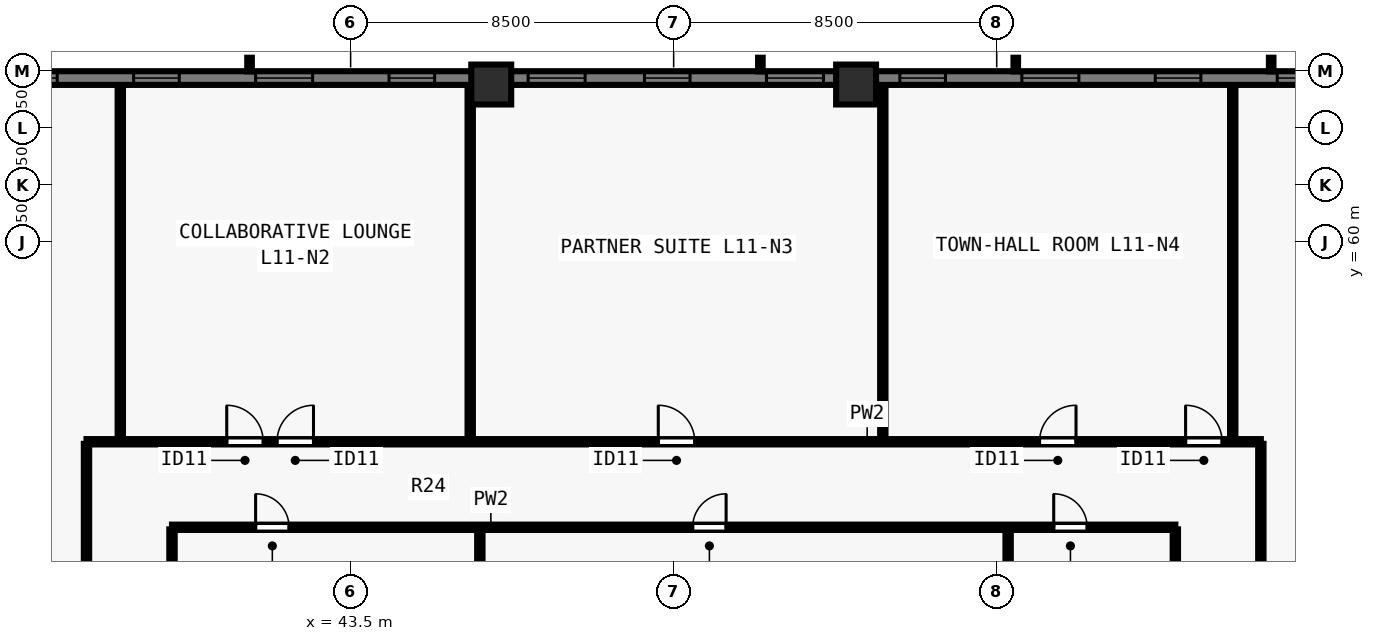
"""IFC4 building model, lengths in metres.
Left out: names, types, materials, properties, quantities, classifications, styles, units other than length and angle.
Written with IfcOpenShell. Run it as: python <this file> out.ifc"""

import sys

from ifc_helpers import new_model, si_unit, direction, frame, frame_2d, origin, origin_2d, place, context, subcontext, project, spatial, rectangle, extrude, element, fill, save


model = new_model("IFC4")
c1 = context("Model", 3, precision=1e-05, world=origin(), true_north=direction((0.0, 1.0)))
c2 = subcontext(c1, "Body", "Model", "MODEL_VIEW")
j1 = project(units=[si_unit("LENGTHUNIT", "METRE"), si_unit("PLANEANGLEUNIT", "RADIAN")], contexts=[c1])
p1 = place(None, origin())
s1 = spatial("IfcSite", under=j1, at=p1, CompositionType="ELEMENT")
p2 = place(p1, origin())
s2 = spatial("IfcBuilding", under=s1, at=p2, CompositionType="ELEMENT")
p3 = place(p2, frame((0.0, 0.0, 44.5)))
s3 = spatial("IfcBuildingStorey", under=s2, at=p3, CompositionType="ELEMENT", Elevation=44.5)
for number, where, z_axis, x_axis in (
    (1, (56.8, 64.15, 0.0), (0.0, 0.0, 1.0), (1.0, 0.0, 0.0)),
    (2, (47.2, 64.15, 0.0), (0.0, 0.0, 1.0), (1.0, 0.0, 0.0)),
):
    element("IfcColumn", number, at=place(p3, frame(where, z_axis=z_axis, x_axis=x_axis)), inside=s3, PredefinedType="COLUMN", context=c2, shape_type="SweptSolid", body=[
        extrude(rectangle(XDim=1.05, YDim=1.05, at=origin_2d()), origin(), (0.0, 0.0, 1.0), 3.5),
    ])
p4 = place(p3, frame((29.5, 64.32, 0.0), z_axis=(0.0, 0.0, 1.0), x_axis=(1.0, 0.0, 0.0)))
e3 = element("IfcWall", 3, at=p4, inside=s3, PredefinedType="SOLIDWALL", context=c2, shape_type="SweptSolid", body=[
    extrude(rectangle(XDim=44.662, YDim=0.36, at=frame_2d((22.331, 0.0))), origin(), (0.0, 0.0, 1.0), 3.28),
])
p5 = place(p4, frame((4.78, 0.0, 0.8)))
e4 = element("IfcOpeningElement", 4, at=p5, cuts=e3, PredefinedType="OPENING", context=c2, shape_type="SweptSolid", body=[
    extrude(rectangle(XDim=1.5, YDim=1.544, at=frame_2d((0.75, 0.772))), frame((0.0, 0.19, 0.0), z_axis=(0.0, -1.0, 0.0), x_axis=(1.0, 0.0, 0.0)), (0.0, 0.0, 1.0), 0.38),
])
p6 = place(p4, frame((8.29, 0.0, 0.8)))
e5 = element("IfcOpeningElement", 5, at=p6, cuts=e3, PredefinedType="OPENING", context=c2, shape_type="SweptSolid", body=[
    extrude(rectangle(XDim=1.2, YDim=1.544, at=frame_2d((0.6, 0.772))), frame((0.0, 0.19, 0.0), z_axis=(0.0, -1.0, 0.0), x_axis=(1.0, 0.0, 0.0)), (0.0, 0.0, 1.0), 0.38),
])
p7 = place(p4, frame((11.5, 0.0, 0.8)))
e6 = element("IfcOpeningElement", 6, at=p7, cuts=e3, PredefinedType="OPENING", context=c2, shape_type="SweptSolid", body=[
    extrude(rectangle(XDim=1.5, YDim=1.544, at=frame_2d((0.75, 0.772))), frame((0.0, 0.19, 0.0), z_axis=(0.0, -1.0, 0.0), x_axis=(1.0, 0.0, 0.0)), (0.0, 0.0, 1.0), 0.38),
])
p8 = place(p4, frame((15.01, 0.0, 0.8)))
e7 = element("IfcOpeningElement", 7, at=p8, cuts=e3, PredefinedType="OPENING", context=c2, shape_type="SweptSolid", body=[
    extrude(rectangle(XDim=1.2, YDim=1.544, at=frame_2d((0.6, 0.772))), frame((0.0, 0.19, 0.0), z_axis=(0.0, -1.0, 0.0), x_axis=(1.0, 0.0, 0.0)), (0.0, 0.0, 1.0), 0.38),
])
p9 = place(p4, frame((18.671, 0.0, 0.8)))
e8 = element("IfcOpeningElement", 8, at=p9, cuts=e3, PredefinedType="OPENING", context=c2, shape_type="SweptSolid", body=[
    extrude(rectangle(XDim=1.5, YDim=1.544, at=frame_2d((0.75, 0.772))), frame((0.0, 0.19, 0.0), z_axis=(0.0, -1.0, 0.0), x_axis=(1.0, 0.0, 0.0)), (0.0, 0.0, 1.0), 0.38),
])
p10 = place(p4, frame((21.731, 0.0, 0.8)))
e9 = element("IfcOpeningElement", 9, at=p10, cuts=e3, PredefinedType="OPENING", context=c2, shape_type="SweptSolid", body=[
    extrude(rectangle(XDim=1.2, YDim=1.544, at=frame_2d((0.6, 0.772))), frame((0.0, 0.19, 0.0), z_axis=(0.0, -1.0, 0.0), x_axis=(1.0, 0.0, 0.0)), (0.0, 0.0, 1.0), 0.38),
])
p11 = place(p4, frame((24.941, 0.0, 0.8)))
e10 = element("IfcOpeningElement", 10, at=p11, cuts=e3, PredefinedType="OPENING", context=c2, shape_type="SweptSolid", body=[
    extrude(rectangle(XDim=1.5, YDim=1.544, at=frame_2d((0.75, 0.772))), frame((0.0, 0.19, 0.0), z_axis=(0.0, -1.0, 0.0), x_axis=(1.0, 0.0, 0.0)), (0.0, 0.0, 1.0), 0.38),
])
p12 = place(p4, frame((28.451, 0.0, 0.8)))
e11 = element("IfcOpeningElement", 11, at=p12, cuts=e3, PredefinedType="OPENING", context=c2, shape_type="SweptSolid", body=[
    extrude(rectangle(XDim=1.2, YDim=1.544, at=frame_2d((0.6, 0.772))), frame((0.0, 0.19, 0.0), z_axis=(0.0, -1.0, 0.0), x_axis=(1.0, 0.0, 0.0)), (0.0, 0.0, 1.0), 0.38),
])
p13 = place(p4, frame((31.662, 0.0, 0.8)))
e12 = element("IfcOpeningElement", 12, at=p13, cuts=e3, PredefinedType="OPENING", context=c2, shape_type="SweptSolid", body=[
    extrude(rectangle(XDim=1.5, YDim=1.544, at=frame_2d((0.75, 0.772))), frame((0.0, 0.19, 0.0), z_axis=(0.0, -1.0, 0.0), x_axis=(1.0, 0.0, 0.0)), (0.0, 0.0, 1.0), 0.38),
])
p14 = place(p4, frame((35.172, 0.0, 0.8)))
e13 = element("IfcOpeningElement", 13, at=p14, cuts=e3, PredefinedType="OPENING", context=c2, shape_type="SweptSolid", body=[
    extrude(rectangle(XDim=1.2, YDim=1.544, at=frame_2d((0.6, 0.772))), frame((0.0, 0.19, 0.0), z_axis=(0.0, -1.0, 0.0), x_axis=(1.0, 0.0, 0.0)), (0.0, 0.0, 1.0), 0.38),
])
p15 = place(p4, frame((38.382, 0.0, 0.8)))
e14 = element("IfcOpeningElement", 14, at=p15, cuts=e3, PredefinedType="OPENING", context=c2, shape_type="SweptSolid", body=[
    extrude(rectangle(XDim=1.5, YDim=1.544, at=frame_2d((0.75, 0.772))), frame((0.0, 0.19, 0.0), z_axis=(0.0, -1.0, 0.0), x_axis=(1.0, 0.0, 0.0)), (0.0, 0.0, 1.0), 0.38),
])
p16 = place(p3, frame((36.55, 54.75, 0.0), z_axis=(0.0, 0.0, 1.0), x_axis=(1.0, 0.0, 0.0)))
e15 = element("IfcWall", 15, at=p16, inside=s3, PredefinedType="PARTITIONING", context=c2, shape_type="SweptSolid", body=[
    extrude(rectangle(XDim=30.9, YDim=0.14, at=frame_2d((15.45, 0.0))), origin(), (0.0, 0.0, 1.0), 3.28),
])
p17 = place(p16, frame((3.69, 0.0, 0.0)))
e16 = element("IfcOpeningElement", 16, at=p17, cuts=e15, PredefinedType="OPENING", context=c2, shape_type="SweptSolid", body=[
    extrude(rectangle(XDim=0.96, YDim=2.12, at=frame_2d((0.48, 1.06))), frame((0.0, 0.08, 0.0), z_axis=(0.0, -1.0, 0.0), x_axis=(1.0, 0.0, 0.0)), (0.0, 0.0, 1.0), 0.16),
])
p18 = place(p16, frame((5.013, 0.0, 0.0)))
e17 = element("IfcOpeningElement", 17, at=p18, cuts=e15, PredefinedType="OPENING", context=c2, shape_type="SweptSolid", body=[
    extrude(rectangle(XDim=0.96, YDim=2.12, at=frame_2d((0.48, 1.06))), frame((0.0, 0.08, 0.0), z_axis=(0.0, -1.0, 0.0), x_axis=(1.0, 0.0, 0.0)), (0.0, 0.0, 1.0), 0.16),
])
p19 = place(p16, frame((15.045, 0.0, 0.0)))
e18 = element("IfcOpeningElement", 18, at=p19, cuts=e15, PredefinedType="OPENING", context=c2, shape_type="SweptSolid", body=[
    extrude(rectangle(XDim=0.96, YDim=2.12, at=frame_2d((0.48, 1.06))), frame((0.0, 0.08, 0.0), z_axis=(0.0, -1.0, 0.0), x_axis=(1.0, 0.0, 0.0)), (0.0, 0.0, 1.0), 0.16),
])
p20 = place(p16, frame((25.077, 0.0, 0.0)))
e19 = element("IfcOpeningElement", 19, at=p20, cuts=e15, PredefinedType="OPENING", context=c2, shape_type="SweptSolid", body=[
    extrude(rectangle(XDim=0.96, YDim=2.12, at=frame_2d((0.48, 1.06))), frame((0.0, 0.08, 0.0), z_axis=(0.0, -1.0, 0.0), x_axis=(1.0, 0.0, 0.0)), (0.0, 0.0, 1.0), 0.16),
])
p21 = place(p16, frame((28.92, 0.0, 0.0)))
e20 = element("IfcOpeningElement", 20, at=p21, cuts=e15, PredefinedType="OPENING", context=c2, shape_type="SweptSolid", body=[
    extrude(rectangle(XDim=0.96, YDim=2.12, at=frame_2d((0.48, 1.06))), frame((0.0, 0.08, 0.0), z_axis=(0.0, -1.0, 0.0), x_axis=(1.0, 0.0, 0.0)), (0.0, 0.0, 1.0), 0.16),
])
p22 = place(p3, frame((36.55, 23.305, 0.0), z_axis=(0.0, 0.0, 1.0), x_axis=(0.0, 1.0, 0.0)))
e21 = element("IfcWall", 21, at=p22, inside=s3, PredefinedType="PARTITIONING", context=c2, shape_type="SweptSolid", body=[
    extrude(rectangle(XDim=31.39, YDim=0.14, at=frame_2d((15.695, 0.0))), origin(), (0.0, 0.0, 1.0), 3.28),
])
p23 = place(p22, frame((3.307, 0.0, 0.0)))
e22 = element("IfcOpeningElement", 22, at=p23, cuts=e21, PredefinedType="OPENING", context=c2, shape_type="SweptSolid", body=[
    extrude(rectangle(XDim=0.96, YDim=2.12, at=frame_2d((0.48, 1.06))), frame((0.0, 0.08, 0.0), z_axis=(0.0, -1.0, 0.0), x_axis=(1.0, 0.0, 0.0)), (0.0, 0.0, 1.0), 0.16),
])
p24 = place(p22, frame((11.25, 0.0, 0.0)))
e23 = element("IfcOpeningElement", 23, at=p24, cuts=e21, PredefinedType="OPENING", context=c2, shape_type="SweptSolid", body=[
    extrude(rectangle(XDim=0.96, YDim=2.12, at=frame_2d((0.48, 1.06))), frame((0.0, 0.08, 0.0), z_axis=(0.0, -1.0, 0.0), x_axis=(1.0, 0.0, 0.0)), (0.0, 0.0, 1.0), 0.16),
])
p25 = place(p22, frame((19.075, 0.0, 0.0)))
e24 = element("IfcOpeningElement", 24, at=p25, cuts=e21, PredefinedType="OPENING", context=c2, shape_type="SweptSolid", body=[
    extrude(rectangle(XDim=0.96, YDim=2.12, at=frame_2d((0.48, 1.06))), frame((0.0, 0.08, 0.0), z_axis=(0.0, -1.0, 0.0), x_axis=(1.0, 0.0, 0.0)), (0.0, 0.0, 1.0), 0.16),
])
p26 = place(p22, frame((26.782, 0.0, 0.0)))
e25 = element("IfcOpeningElement", 25, at=p26, cuts=e21, PredefinedType="OPENING", context=c2, shape_type="SweptSolid", body=[
    extrude(rectangle(XDim=0.96, YDim=2.12, at=frame_2d((0.48, 1.06))), frame((0.0, 0.08, 0.0), z_axis=(0.0, -1.0, 0.0), x_axis=(1.0, 0.0, 0.0)), (0.0, 0.0, 1.0), 0.16),
])
p27 = place(p3, frame((67.45, 23.305, 0.0), z_axis=(0.0, 0.0, 1.0), x_axis=(0.0, 1.0, 0.0)))
e26 = element("IfcWall", 26, at=p27, inside=s3, PredefinedType="PARTITIONING", context=c2, shape_type="SweptSolid", body=[
    extrude(rectangle(XDim=31.39, YDim=0.14, at=frame_2d((15.695, 0.0))), origin(), (0.0, 0.0, 1.0), 3.28),
])
p28 = place(p27, frame((7.561, 0.0, 0.0)))
e27 = element("IfcOpeningElement", 27, at=p28, cuts=e26, PredefinedType="OPENING", context=c2, shape_type="SweptSolid", body=[
    extrude(rectangle(XDim=0.96, YDim=2.12, at=frame_2d((0.48, 1.06))), frame((0.0, 0.08, 0.0), z_axis=(0.0, -1.0, 0.0), x_axis=(1.0, 0.0, 0.0)), (0.0, 0.0, 1.0), 0.16),
])
p29 = place(p27, frame((23.211, 0.0, 0.0)))
e28 = element("IfcOpeningElement", 28, at=p29, cuts=e26, PredefinedType="OPENING", context=c2, shape_type="SweptSolid", body=[
    extrude(rectangle(XDim=0.96, YDim=2.12, at=frame_2d((0.48, 1.06))), frame((0.0, 0.08, 0.0), z_axis=(0.0, -1.0, 0.0), x_axis=(1.0, 0.0, 0.0)), (0.0, 0.0, 1.0), 0.16),
])
p30 = place(p3, frame((38.8, 52.5, 0.0), z_axis=(0.0, 0.0, 1.0), x_axis=(1.0, 0.0, 0.0)))
e29 = element("IfcWall", 29, at=p30, inside=s3, PredefinedType="PARTITIONING", context=c2, shape_type="SweptSolid", body=[
    extrude(rectangle(XDim=26.4, YDim=0.14, at=frame_2d((13.2, 0.0))), origin(), (0.0, 0.0, 1.0), 3.28),
])
p31 = place(p30, frame((2.2, 0.0, 0.0)))
e30 = element("IfcOpeningElement", 30, at=p31, cuts=e29, PredefinedType="OPENING", context=c2, shape_type="SweptSolid", body=[
    extrude(rectangle(XDim=0.88, YDim=2.1, at=frame_2d((0.44, 1.05))), frame((0.0, 0.08, 0.0), z_axis=(0.0, -1.0, 0.0), x_axis=(1.0, 0.0, 0.0)), (0.0, 0.0, 1.0), 0.16),
])
p32 = place(p30, frame((13.7, 0.0, 0.0)))
e31 = element("IfcOpeningElement", 31, at=p32, cuts=e29, PredefinedType="OPENING", context=c2, shape_type="SweptSolid", body=[
    extrude(rectangle(XDim=0.88, YDim=2.1, at=frame_2d((0.44, 1.05))), frame((0.0, 0.08, 0.0), z_axis=(0.0, -1.0, 0.0), x_axis=(1.0, 0.0, 0.0)), (0.0, 0.0, 1.0), 0.16),
])
p33 = place(p30, frame((23.2, 0.0, 0.0)))
e32 = element("IfcOpeningElement", 32, at=p33, cuts=e29, PredefinedType="OPENING", context=c2, shape_type="SweptSolid", body=[
    extrude(rectangle(XDim=0.88, YDim=2.1, at=frame_2d((0.44, 1.05))), frame((0.0, 0.08, 0.0), z_axis=(0.0, -1.0, 0.0), x_axis=(1.0, 0.0, 0.0)), (0.0, 0.0, 1.0), 0.16),
])
p34 = place(p3, frame((38.8, 40.8, 0.0), z_axis=(0.0, 0.0, 1.0), x_axis=(0.0, 1.0, 0.0)))
e33 = element("IfcWall", 33, at=p34, inside=s3, PredefinedType="PARTITIONING", context=c2, shape_type="SweptSolid", body=[
    extrude(rectangle(XDim=11.645, YDim=0.14, at=frame_2d((5.823, 0.0))), origin(), (0.0, 0.0, 1.0), 3.28),
])
p35 = place(p34, frame((2.5, 0.0, 0.0)))
e34 = element("IfcOpeningElement", 34, at=p35, cuts=e33, PredefinedType="OPENING", context=c2, shape_type="SweptSolid", body=[
    extrude(rectangle(XDim=0.88, YDim=2.1, at=frame_2d((0.44, 1.05))), frame((0.0, 0.08, 0.0), z_axis=(0.0, -1.0, 0.0), x_axis=(1.0, 0.0, 0.0)), (0.0, 0.0, 1.0), 0.16),
])
p36 = place(p3, frame((65.2, 40.8, 0.0), z_axis=(0.0, 0.0, 1.0), x_axis=(0.0, 1.0, 0.0)))
e35 = element("IfcWall", 35, at=p36, inside=s3, PredefinedType="PARTITIONING", context=c2, shape_type="SweptSolid", body=[
    extrude(rectangle(XDim=11.645, YDim=0.14, at=frame_2d((5.823, 0.0))), origin(), (0.0, 0.0, 1.0), 3.28),
])
p37 = place(p36, frame((2.5, 0.0, 0.0)))
e36 = element("IfcOpeningElement", 36, at=p37, cuts=e35, PredefinedType="OPENING", context=c2, shape_type="SweptSolid", body=[
    extrude(rectangle(XDim=0.88, YDim=2.1, at=frame_2d((0.44, 1.05))), frame((0.0, 0.08, 0.0), z_axis=(0.0, -1.0, 0.0), x_axis=(1.0, 0.0, 0.0)), (0.0, 0.0, 1.0), 0.16),
])
p38 = place(p3, frame((46.9, 47.76, 0.0), z_axis=(0.0, 0.0, 1.0), x_axis=(0.0, 1.0, 0.0)))
e37 = element("IfcWall", 37, at=p38, inside=s3, PredefinedType="PARTITIONING", context=c2, shape_type="SweptSolid", body=[
    extrude(rectangle(XDim=4.685, YDim=0.14, at=frame_2d((2.343, 0.0))), origin(), (0.0, 0.0, 1.0), 3.28),
])
p39 = place(p3, frame((60.8, 47.76, 0.0), z_axis=(0.0, 0.0, 1.0), x_axis=(0.0, 1.0, 0.0)))
e38 = element("IfcWall", 38, at=p39, inside=s3, PredefinedType="PARTITIONING", context=c2, shape_type="SweptSolid", body=[
    extrude(rectangle(XDim=4.685, YDim=0.14, at=frame_2d((2.343, 0.0))), origin(), (0.0, 0.0, 1.0), 2.439),
])
for number, where, z_axis, x_axis in (
    (39, (37.439, 54.85, 0.0), (0.0, 0.0, 1.0), (0.0, 1.0, 0.0)),
    (40, (46.646, 54.85, 0.0), (0.0, 0.0, 1.0), (0.0, 1.0, 0.0)),
    (41, (57.503, 54.85, 0.0), (0.0, 0.0, 1.0), (0.0, 1.0, 0.0)),
):
    element("IfcWall", number, at=place(p3, frame(where, z_axis=z_axis, x_axis=x_axis)), inside=s3, PredefinedType="PARTITIONING", context=c2, shape_type="SweptSolid", body=[
        extrude(rectangle(XDim=9.23, YDim=0.14, at=frame_2d((4.615, 0.0))), origin(), (0.0, 0.0, 1.0), 3.28),
    ])
p40 = place(p3, frame((66.71, 54.85, 0.0), z_axis=(0.0, 0.0, 1.0), x_axis=(0.0, 1.0, 0.0)))
e42 = element("IfcWall", 42, at=p40, inside=s3, PredefinedType="PARTITIONING", context=c2, shape_type="SweptSolid", body=[
    extrude(rectangle(XDim=9.23, YDim=0.14, at=frame_2d((4.615, 0.0))), origin(), (0.0, 0.0, 1.0), 2.439),
])
p41 = place(p5, origin())
e43 = element("IfcWindow", 43, at=p41, inside=s3, PartitioningType="SINGLE_PANEL", PredefinedType="WINDOW", context=c2, shape_type="SweptSolid", body=[
    extrude(rectangle(XDim=1.5, YDim=1.544, at=frame_2d((0.75, 0.772))), frame((0.0, -0.05, 0.0), z_axis=(0.0, -1.0, 0.0), x_axis=(1.0, 0.0, 0.0)), (0.0, 0.0, 1.0), 0.06),
])
fill(e4, e43)
p42 = place(p6, origin())
e44 = element("IfcWindow", 44, at=p42, inside=s3, PartitioningType="SINGLE_PANEL", PredefinedType="WINDOW", context=c2, shape_type="SweptSolid", body=[
    extrude(rectangle(XDim=1.2, YDim=1.544, at=frame_2d((0.6, 0.772))), frame((0.0, -0.05, 0.0), z_axis=(0.0, -1.0, 0.0), x_axis=(1.0, 0.0, 0.0)), (0.0, 0.0, 1.0), 0.06),
])
fill(e5, e44)
p43 = place(p7, origin())
e45 = element("IfcWindow", 45, at=p43, inside=s3, PartitioningType="SINGLE_PANEL", PredefinedType="WINDOW", context=c2, shape_type="SweptSolid", body=[
    extrude(rectangle(XDim=1.5, YDim=1.544, at=frame_2d((0.75, 0.772))), frame((0.0, -0.05, 0.0), z_axis=(0.0, -1.0, 0.0), x_axis=(1.0, 0.0, 0.0)), (0.0, 0.0, 1.0), 0.06),
])
fill(e6, e45)
p44 = place(p8, origin())
e46 = element("IfcWindow", 46, at=p44, inside=s3, PartitioningType="SINGLE_PANEL", PredefinedType="WINDOW", context=c2, shape_type="SweptSolid", body=[
    extrude(rectangle(XDim=1.2, YDim=1.544, at=frame_2d((0.6, 0.772))), frame((0.0, -0.05, 0.0), z_axis=(0.0, -1.0, 0.0), x_axis=(1.0, 0.0, 0.0)), (0.0, 0.0, 1.0), 0.06),
])
fill(e7, e46)
p45 = place(p9, origin())
e47 = element("IfcWindow", 47, at=p45, inside=s3, PartitioningType="SINGLE_PANEL", PredefinedType="WINDOW", context=c2, shape_type="SweptSolid", body=[
    extrude(rectangle(XDim=1.5, YDim=1.544, at=frame_2d((0.75, 0.772))), frame((0.0, -0.05, 0.0), z_axis=(0.0, -1.0, 0.0), x_axis=(1.0, 0.0, 0.0)), (0.0, 0.0, 1.0), 0.06),
])
fill(e8, e47)
p46 = place(p10, origin())
e48 = element("IfcWindow", 48, at=p46, inside=s3, PartitioningType="SINGLE_PANEL", PredefinedType="WINDOW", context=c2, shape_type="SweptSolid", body=[
    extrude(rectangle(XDim=1.2, YDim=1.544, at=frame_2d((0.6, 0.772))), frame((0.0, -0.05, 0.0), z_axis=(0.0, -1.0, 0.0), x_axis=(1.0, 0.0, 0.0)), (0.0, 0.0, 1.0), 0.06),
])
fill(e9, e48)
p47 = place(p11, origin())
e49 = element("IfcWindow", 49, at=p47, inside=s3, PartitioningType="SINGLE_PANEL", PredefinedType="WINDOW", context=c2, shape_type="SweptSolid", body=[
    extrude(rectangle(XDim=1.5, YDim=1.544, at=frame_2d((0.75, 0.772))), frame((0.0, -0.05, 0.0), z_axis=(0.0, -1.0, 0.0), x_axis=(1.0, 0.0, 0.0)), (0.0, 0.0, 1.0), 0.06),
])
fill(e10, e49)
p48 = place(p12, origin())
e50 = element("IfcWindow", 50, at=p48, inside=s3, PartitioningType="SINGLE_PANEL", PredefinedType="WINDOW", context=c2, shape_type="SweptSolid", body=[
    extrude(rectangle(XDim=1.2, YDim=1.544, at=frame_2d((0.6, 0.772))), frame((0.0, -0.05, 0.0), z_axis=(0.0, -1.0, 0.0), x_axis=(1.0, 0.0, 0.0)), (0.0, 0.0, 1.0), 0.06),
])
fill(e11, e50)
p49 = place(p13, origin())
e51 = element("IfcWindow", 51, at=p49, inside=s3, PartitioningType="SINGLE_PANEL", PredefinedType="WINDOW", context=c2, shape_type="SweptSolid", body=[
    extrude(rectangle(XDim=1.5, YDim=1.544, at=frame_2d((0.75, 0.772))), frame((0.0, -0.05, 0.0), z_axis=(0.0, -1.0, 0.0), x_axis=(1.0, 0.0, 0.0)), (0.0, 0.0, 1.0), 0.06),
])
fill(e12, e51)
p50 = place(p14, origin())
e52 = element("IfcWindow", 52, at=p50, inside=s3, PartitioningType="SINGLE_PANEL", PredefinedType="WINDOW", context=c2, shape_type="SweptSolid", body=[
    extrude(rectangle(XDim=1.2, YDim=1.544, at=frame_2d((0.6, 0.772))), frame((0.0, -0.05, 0.0), z_axis=(0.0, -1.0, 0.0), x_axis=(1.0, 0.0, 0.0)), (0.0, 0.0, 1.0), 0.06),
])
fill(e13, e52)
p51 = place(p15, origin())
e53 = element("IfcWindow", 53, at=p51, inside=s3, PartitioningType="SINGLE_PANEL", PredefinedType="WINDOW", context=c2, shape_type="SweptSolid", body=[
    extrude(rectangle(XDim=1.5, YDim=1.544, at=frame_2d((0.75, 0.772))), frame((0.0, -0.05, 0.0), z_axis=(0.0, -1.0, 0.0), x_axis=(1.0, 0.0, 0.0)), (0.0, 0.0, 1.0), 0.06),
])
fill(e14, e53)
p52 = place(p31, origin())
e54 = element("IfcDoor", 54, at=p52, inside=s3, OperationType="SINGLE_SWING_LEFT", PredefinedType="DOOR", context=c2, shape_type="SweptSolid", body=[
    extrude(rectangle(XDim=0.88, YDim=2.1, at=frame_2d((0.44, 1.05))), frame((0.0, 0.025, 0.0), z_axis=(0.0, -1.0, 0.0), x_axis=(1.0, 0.0, 0.0)), (0.0, 0.0, 1.0), 0.05),
])
fill(e30, e54)
p53 = place(p32, origin())
e55 = element("IfcDoor", 55, at=p53, inside=s3, OperationType="SINGLE_SWING_RIGHT", PredefinedType="DOOR", context=c2, shape_type="SweptSolid", body=[
    extrude(rectangle(XDim=0.88, YDim=2.1, at=frame_2d((0.44, 1.05))), frame((0.0, 0.025, 0.0), z_axis=(0.0, -1.0, 0.0), x_axis=(1.0, 0.0, 0.0)), (0.0, 0.0, 1.0), 0.05),
])
fill(e31, e55)
p54 = place(p33, origin())
e56 = element("IfcDoor", 56, at=p54, inside=s3, OperationType="SINGLE_SWING_LEFT", PredefinedType="DOOR", context=c2, shape_type="SweptSolid", body=[
    extrude(rectangle(XDim=0.88, YDim=2.1, at=frame_2d((0.44, 1.05))), frame((0.0, 0.025, 0.0), z_axis=(0.0, -1.0, 0.0), x_axis=(1.0, 0.0, 0.0)), (0.0, 0.0, 1.0), 0.05),
])
fill(e32, e56)
p55 = place(p17, origin())
e57 = element("IfcDoor", 57, at=p55, inside=s3, OperationType="SINGLE_SWING_LEFT", PredefinedType="DOOR", context=c2, shape_type="SweptSolid", body=[
    extrude(rectangle(XDim=0.96, YDim=2.12, at=frame_2d((0.48, 1.06))), frame((0.0, 0.025, 0.0), z_axis=(0.0, -1.0, 0.0), x_axis=(1.0, 0.0, 0.0)), (0.0, 0.0, 1.0), 0.05),
])
fill(e16, e57)
p56 = place(p18, origin())
e58 = element("IfcDoor", 58, at=p56, inside=s3, OperationType="SINGLE_SWING_RIGHT", PredefinedType="DOOR", context=c2, shape_type="SweptSolid", body=[
    extrude(rectangle(XDim=0.96, YDim=2.12, at=frame_2d((0.48, 1.06))), frame((0.0, 0.025, 0.0), z_axis=(0.0, -1.0, 0.0), x_axis=(1.0, 0.0, 0.0)), (0.0, 0.0, 1.0), 0.05),
])
fill(e17, e58)
p57 = place(p19, origin())
e59 = element("IfcDoor", 59, at=p57, inside=s3, OperationType="SINGLE_SWING_LEFT", PredefinedType="DOOR", context=c2, shape_type="SweptSolid", body=[
    extrude(rectangle(XDim=0.96, YDim=2.12, at=frame_2d((0.48, 1.06))), frame((0.0, 0.025, 0.0), z_axis=(0.0, -1.0, 0.0), x_axis=(1.0, 0.0, 0.0)), (0.0, 0.0, 1.0), 0.05),
])
fill(e18, e59)
p58 = place(p20, origin())
e60 = element("IfcDoor", 60, at=p58, inside=s3, OperationType="SINGLE_SWING_RIGHT", PredefinedType="DOOR", context=c2, shape_type="SweptSolid", body=[
    extrude(rectangle(XDim=0.96, YDim=2.12, at=frame_2d((0.48, 1.06))), frame((0.0, 0.025, 0.0), z_axis=(0.0, -1.0, 0.0), x_axis=(1.0, 0.0, 0.0)), (0.0, 0.0, 1.0), 0.05),
])
fill(e19, e60)
p59 = place(p21, origin())
e61 = element("IfcDoor", 61, at=p59, inside=s3, OperationType="SINGLE_SWING_LEFT", PredefinedType="DOOR", context=c2, shape_type="SweptSolid", body=[
    extrude(rectangle(XDim=0.96, YDim=2.12, at=frame_2d((0.48, 1.06))), frame((0.0, 0.025, 0.0), z_axis=(0.0, -1.0, 0.0), x_axis=(1.0, 0.0, 0.0)), (0.0, 0.0, 1.0), 0.05),
])
fill(e20, e61)
save(model, sys.argv[1])
